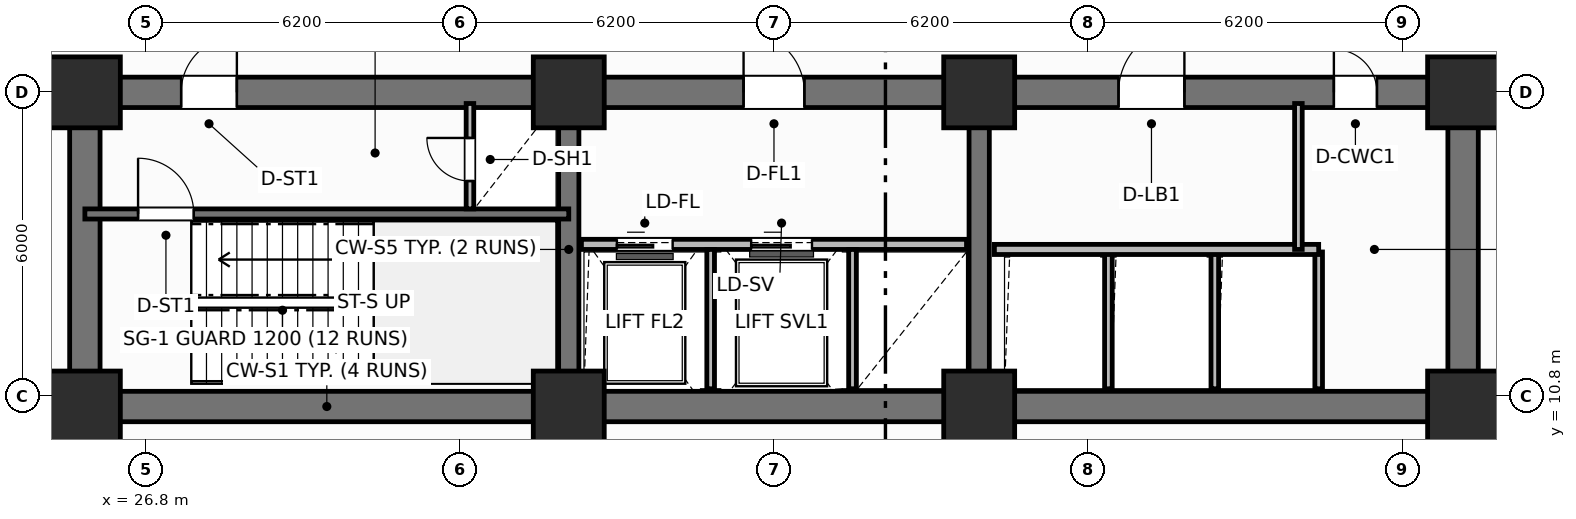
"""IFC4 building model, lengths in metres.
Left out: names, types, materials, properties, quantities, classifications, styles, units other than length and angle.
Written with IfcOpenShell. Run it as: python <this file> out.ifc"""

import sys

from ifc_helpers import new_model, si_unit, direction, frame, frame_2d, origin, origin_2d, place, context, subcontext, project, spatial, rectangle, extrude, element, fill, save


model = new_model("IFC4")
c1 = context("Model", 3, precision=1e-05, world=origin(), true_north=direction((0.0, 1.0)))
c2 = subcontext(c1, "Body", "Model", "MODEL_VIEW")
j1 = project(units=[si_unit("LENGTHUNIT", "METRE"), si_unit("PLANEANGLEUNIT", "RADIAN")], contexts=[c1])
p1 = place(None, origin())
s1 = spatial("IfcSite", under=j1, at=p1, CompositionType="ELEMENT")
p2 = place(p1, origin())
s2 = spatial("IfcBuilding", under=s1, at=p2, CompositionType="ELEMENT")
p3 = place(p2, frame((0.0, 0.0, 11.1)))
s3 = spatial("IfcBuildingStorey", under=s2, at=p3, CompositionType="ELEMENT", Elevation=11.1)
p4 = place(p3, frame((52.8, 10.6, 0.0), z_axis=(0.0, 0.0, 1.0), x_axis=(-1.0, 0.0, 0.0)))
e1 = element("IfcWall", 1, at=p4, inside=s3, PredefinedType="SHEAR", context=c2, shape_type="SweptSolid", body=[
    extrude(rectangle(XDim=27.2, YDim=0.6, at=frame_2d((13.6, 0.0))), origin(), (0.0, 0.0, 1.0), 4.5),
])
for number, where, z_axis, x_axis in (
    (2, (25.6, 10.9, 0.0), (0.0, 0.0, 1.0), (0.0, 1.0, 0.0)),
    (3, (52.8, 10.9, 0.0), (0.0, 0.0, 1.0), (0.0, 1.0, 0.0)),
):
    element("IfcWall", number, at=place(p3, frame(where, z_axis=z_axis, x_axis=x_axis)), inside=s3, PredefinedType="SHEAR", context=c2, shape_type="SweptSolid", body=[
        extrude(rectangle(XDim=5.6, YDim=0.6, at=frame_2d((2.8, 0.0))), origin(), (0.0, 0.0, 1.0), 4.5),
    ])
p5 = place(p3, frame((25.6, 16.8, 0.0), z_axis=(0.0, 0.0, 1.0), x_axis=(1.0, 0.0, 0.0)))
e4 = element("IfcWall", 4, at=p5, inside=s3, PredefinedType="SHEAR", context=c2, shape_type="SweptSolid", body=[
    extrude(rectangle(XDim=27.2, YDim=0.6, at=frame_2d((13.6, 0.0))), origin(), (0.0, 0.0, 1.0), 4.5),
])
p6 = place(p5, frame((1.9, 0.0, 0.0)))
e5 = element("IfcOpeningElement", 5, at=p6, cuts=e4, PredefinedType="OPENING", context=c2, shape_type="SweptSolid", body=[
    extrude(rectangle(XDim=1.1, YDim=2.15, at=frame_2d((0.55, 1.075))), frame((0.0, 0.31, 0.0), z_axis=(0.0, -1.0, 0.0), x_axis=(1.0, 0.0, 0.0)), (0.0, 0.0, 1.0), 0.62),
])
p7 = place(p5, frame((13.0, 0.0, 0.0)))
e6 = element("IfcOpeningElement", 6, at=p7, cuts=e4, PredefinedType="OPENING", context=c2, shape_type="SweptSolid", body=[
    extrude(rectangle(XDim=1.2, YDim=2.15, at=frame_2d((0.6, 1.075))), frame((0.0, 0.31, 0.0), z_axis=(0.0, -1.0, 0.0), x_axis=(1.0, 0.0, 0.0)), (0.0, 0.0, 1.0), 0.62),
])
p8 = place(p5, frame((20.4, 0.0, 0.0)))
e7 = element("IfcOpeningElement", 7, at=p8, cuts=e4, PredefinedType="OPENING", context=c2, shape_type="SweptSolid", body=[
    extrude(rectangle(XDim=1.3, YDim=2.2, at=frame_2d((0.65, 1.1))), frame((0.0, 0.31, 0.0), z_axis=(0.0, -1.0, 0.0), x_axis=(1.0, 0.0, 0.0)), (0.0, 0.0, 1.0), 0.62),
])
p9 = place(p5, frame((24.65, 0.0, 0.0)))
e8 = element("IfcOpeningElement", 8, at=p9, cuts=e4, PredefinedType="OPENING", context=c2, shape_type="SweptSolid", body=[
    extrude(rectangle(XDim=0.85, YDim=2.1, at=frame_2d((0.425, 1.05))), frame((0.0, 0.31, 0.0), z_axis=(0.0, -1.0, 0.0), x_axis=(1.0, 0.0, 0.0)), (0.0, 0.0, 1.0), 0.62),
])
for number, where, z_axis, x_axis in (
    (9, (35.15, 10.9, 0.0), (0.0, 0.0, 1.0), (0.0, 1.0, 0.0)),
    (10, (43.25, 10.9, 0.0), (0.0, 0.0, 1.0), (0.0, 1.0, 0.0)),
):
    element("IfcWall", number, at=place(p3, frame(where, z_axis=z_axis, x_axis=x_axis)), inside=s3, PredefinedType="SHEAR", context=c2, shape_type="SweptSolid", body=[
        extrude(rectangle(XDim=5.6, YDim=0.4, at=frame_2d((2.8, 0.0))), origin(), (0.0, 0.0, 1.0), 4.5),
    ])
for number, where, z_axis, x_axis in (
    (11, (25.6, 10.6, 0.0), (0.0, 0.0, 1.0), (1.0, 0.0, 0.0)),
    (12, (25.6, 16.8, 0.0), (0.0, 0.0, 1.0), (1.0, 0.0, 0.0)),
    (13, (35.15, 10.6, 0.0), (0.0, 0.0, 1.0), (1.0, 0.0, 0.0)),
    (14, (35.15, 16.8, 0.0), (0.0, 0.0, 1.0), (1.0, 0.0, 0.0)),
    (15, (43.25, 10.6, 0.0), (0.0, 0.0, 1.0), (1.0, 0.0, 0.0)),
    (16, (43.25, 16.8, 0.0), (0.0, 0.0, 1.0), (1.0, 0.0, 0.0)),
    (17, (52.8, 10.6, 0.0), (0.0, 0.0, 1.0), (1.0, 0.0, 0.0)),
    (18, (52.8, 16.8, 0.0), (0.0, 0.0, 1.0), (1.0, 0.0, 0.0)),
):
    element("IfcColumn", number, at=place(p3, frame(where, z_axis=z_axis, x_axis=x_axis)), inside=s3, PredefinedType="COLUMN", context=c2, shape_type="SweptSolid", body=[
        extrude(rectangle(XDim=1.4, YDim=1.4, at=origin_2d()), origin(), (0.0, 0.0, 1.0), 4.5),
    ])
p10 = place(p3, frame((25.6, 14.4, 0.0), z_axis=(0.0, 0.0, 1.0), x_axis=(1.0, 0.0, 0.0)))
e19 = element("IfcWall", 19, at=p10, inside=s3, PredefinedType="SHEAR", context=c2, shape_type="SweptSolid", body=[
    extrude(rectangle(XDim=9.55, YDim=0.2, at=frame_2d((4.775, 0.0))), origin(), (0.0, 0.0, 1.0), 4.5),
])
p11 = place(p10, frame((1.05, 0.0, 0.0)))
e20 = element("IfcOpeningElement", 20, at=p11, cuts=e19, PredefinedType="OPENING", context=c2, shape_type="SweptSolid", body=[
    extrude(rectangle(XDim=1.1, YDim=2.15, at=frame_2d((0.55, 1.075))), frame((0.0, 0.11, 0.0), z_axis=(0.0, -1.0, 0.0), x_axis=(1.0, 0.0, 0.0)), (0.0, 0.0, 1.0), 0.22),
])
p12 = place(p3, frame((33.2, 14.5, 0.0), z_axis=(0.0, 0.0, 1.0), x_axis=(0.0, 1.0, 0.0)))
e21 = element("IfcWall", 21, at=p12, inside=s3, PredefinedType="PARTITIONING", context=c2, shape_type="SweptSolid", body=[
    extrude(rectangle(XDim=2.08, YDim=0.15, at=frame_2d((1.04, 0.0))), origin(), (0.0, 0.0, 1.0), 3.42),
])
p13 = place(p12, frame((0.55, 0.0, 0.0)))
e22 = element("IfcOpeningElement", 22, at=p13, cuts=e21, PredefinedType="OPENING", context=c2, shape_type="SweptSolid", body=[
    extrude(rectangle(XDim=0.85, YDim=2.05, at=frame_2d((0.425, 1.025))), frame((0.0, 0.085, 0.0), z_axis=(0.0, -1.0, 0.0), x_axis=(1.0, 0.0, 0.0)), (0.0, 0.0, 1.0), 0.17),
])
p14 = place(p3, frame((35.4, 13.8, 0.0), z_axis=(0.0, 0.0, 1.0), x_axis=(1.0, 0.0, 0.0)))
e23 = element("IfcWall", 23, at=p14, inside=s3, PredefinedType="PARTITIONING", context=c2, shape_type="SweptSolid", body=[
    extrude(rectangle(XDim=7.6, YDim=0.2, at=frame_2d((3.8, 0.0))), origin(), (0.0, 0.0, 1.0), 3.08),
])
p15 = place(p14, frame((0.7, 0.0, 0.0)))
e24 = element("IfcOpeningElement", 24, at=p15, cuts=e23, PredefinedType="OPENING", context=c2, shape_type="SweptSolid", body=[
    extrude(rectangle(XDim=1.1, YDim=2.15, at=frame_2d((0.55, 1.075))), frame((0.0, 0.11, 0.0), z_axis=(0.0, -1.0, 0.0), x_axis=(1.0, 0.0, 0.0)), (0.0, 0.0, 1.0), 0.22),
])
p16 = place(p14, frame((3.35, 0.0, 0.0)))
e25 = element("IfcOpeningElement", 25, at=p16, cuts=e23, PredefinedType="OPENING", context=c2, shape_type="SweptSolid", body=[
    extrude(rectangle(XDim=1.2, YDim=2.15, at=frame_2d((0.6, 1.075))), frame((0.0, 0.11, 0.0), z_axis=(0.0, -1.0, 0.0), x_axis=(1.0, 0.0, 0.0)), (0.0, 0.0, 1.0), 0.22),
])
for number, where, z_axis, x_axis in (
    (26, (37.95, 10.95, 0.0), (0.0, 0.0, 1.0), (0.0, 1.0, 0.0)),
    (27, (40.75, 10.95, 0.0), (0.0, 0.0, 1.0), (0.0, 1.0, 0.0)),
):
    element("IfcWall", number, at=place(p3, frame(where, z_axis=z_axis, x_axis=x_axis)), inside=s3, PredefinedType="PARTITIONING", context=c2, shape_type="SweptSolid", body=[
        extrude(rectangle(XDim=2.75, YDim=0.15, at=frame_2d((1.375, 0.0))), origin(), (0.0, 0.0, 1.0), 3.42),
    ])
for number, where, z_axis, x_axis in (
    (28, (45.8, 10.95, 0.0), (0.0, 0.0, 1.0), (0.0, 1.0, 0.0)),
    (29, (47.9, 10.95, 0.0), (0.0, 0.0, 1.0), (0.0, 1.0, 0.0)),
    (30, (49.95, 10.95, 0.0), (0.0, 0.0, 1.0), (0.0, 1.0, 0.0)),
):
    element("IfcWall", number, at=place(p3, frame(where, z_axis=z_axis, x_axis=x_axis)), inside=s3, PredefinedType="PARTITIONING", context=c2, shape_type="SweptSolid", body=[
        extrude(rectangle(XDim=2.7, YDim=0.15, at=frame_2d((1.35, 0.0))), origin(), (0.0, 0.0, 1.0), 3.42),
    ])
p17 = place(p3, frame((43.55, 13.7, 0.0), z_axis=(0.0, 0.0, 1.0), x_axis=(1.0, 0.0, 0.0)))
e31 = element("IfcWall", 31, at=p17, inside=s3, PredefinedType="PARTITIONING", context=c2, shape_type="SweptSolid", body=[
    extrude(rectangle(XDim=6.4, YDim=0.2, at=frame_2d((3.2, 0.0))), origin(), (0.0, 0.0, 1.0), 3.42),
])
p18 = place(p3, frame((49.55, 13.7, 0.0), z_axis=(0.0, 0.0, 1.0), x_axis=(0.0, 1.0, 0.0)))
e32 = element("IfcWall", 32, at=p18, inside=s3, PredefinedType="PARTITIONING", context=c2, shape_type="SweptSolid", body=[
    extrude(rectangle(XDim=2.88, YDim=0.15, at=frame_2d((1.44, 0.0))), origin(), (0.0, 0.0, 1.0), 3.42),
])
p19 = place(p3, frame((12.0, 16.85, 0.0), z_axis=(0.0, 0.0, 1.0), x_axis=(1.0, 0.0, 0.0)))
e33 = element("IfcWall", 33, at=p19, inside=s3, PredefinedType="PARTITIONING", context=c2, shape_type="SweptSolid", body=[
    extrude(rectangle(XDim=13.25, YDim=0.15, at=frame_2d((6.625, 0.0))), origin(), (0.0, 0.0, 1.0), 3.42),
])
p20 = place(p19, frame((7.5, 0.0, 0.0)))
e34 = element("IfcOpeningElement", 34, at=p20, cuts=e33, PredefinedType="OPENING", context=c2, shape_type="SweptSolid", body=[
    extrude(rectangle(XDim=1.0, YDim=2.15, at=frame_2d((0.5, 1.075))), frame((0.0, 0.085, 0.0), z_axis=(0.0, -1.0, 0.0), x_axis=(1.0, 0.0, 0.0)), (0.0, 0.0, 1.0), 0.17),
])
p21 = place(p3, frame((53.15, 16.85, 0.0), z_axis=(0.0, 0.0, 1.0), x_axis=(1.0, 0.0, 0.0)))
e35 = element("IfcWall", 35, at=p21, inside=s3, PredefinedType="PARTITIONING", context=c2, shape_type="SweptSolid", body=[
    extrude(rectangle(XDim=13.25, YDim=0.15, at=frame_2d((6.625, 0.0))), origin(), (0.0, 0.0, 1.0), 3.42),
])
p22 = place(p21, frame((4.2, 0.0, 0.0)))
e36 = element("IfcOpeningElement", 36, at=p22, cuts=e35, PredefinedType="OPENING", context=c2, shape_type="SweptSolid", body=[
    extrude(rectangle(XDim=1.0, YDim=2.15, at=frame_2d((0.5, 1.075))), frame((0.0, 0.085, 0.0), z_axis=(0.0, -1.0, 0.0), x_axis=(1.0, 0.0, 0.0)), (0.0, 0.0, 1.0), 0.17),
])
p23 = place(p11, origin())
e37 = element("IfcDoor", 37, at=p23, inside=s3, OperationType="SINGLE_SWING_LEFT", PredefinedType="DOOR", context=c2, shape_type="SweptSolid", body=[
    extrude(rectangle(XDim=1.1, YDim=2.15, at=frame_2d((0.55, 1.075))), frame((0.0, 0.025, 0.0), z_axis=(0.0, -1.0, 0.0), x_axis=(1.0, 0.0, 0.0)), (0.0, 0.0, 1.0), 0.05),
])
fill(e20, e37)
p24 = place(p13, origin())
e38 = element("IfcDoor", 38, at=p24, inside=s3, OperationType="SINGLE_SWING_RIGHT", PredefinedType="TRAPDOOR", context=c2, shape_type="SweptSolid", body=[
    extrude(rectangle(XDim=0.85, YDim=2.05, at=frame_2d((0.425, 1.025))), frame((0.0, 0.025, 0.0), z_axis=(0.0, -1.0, 0.0), x_axis=(1.0, 0.0, 0.0)), (0.0, 0.0, 1.0), 0.05),
])
fill(e22, e38)
p25 = place(p15, origin())
e39 = element("IfcDoor", 39, at=p25, inside=s3, OperationType="SLIDING_TO_LEFT", PredefinedType="DOOR", context=c2, shape_type="SweptSolid", body=[
    extrude(rectangle(XDim=1.1, YDim=2.15, at=frame_2d((0.55, 1.075))), frame((0.0, 0.025, 0.0), z_axis=(0.0, -1.0, 0.0), x_axis=(1.0, 0.0, 0.0)), (0.0, 0.0, 1.0), 0.05),
])
fill(e24, e39)
p26 = place(p16, origin())
e40 = element("IfcDoor", 40, at=p26, inside=s3, OperationType="SLIDING_TO_LEFT", PredefinedType="DOOR", context=c2, shape_type="SweptSolid", body=[
    extrude(rectangle(XDim=1.2, YDim=2.15, at=frame_2d((0.6, 1.075))), frame((0.0, 0.025, 0.0), z_axis=(0.0, -1.0, 0.0), x_axis=(1.0, 0.0, 0.0)), (0.0, 0.0, 1.0), 0.05),
])
fill(e25, e40)
p27 = place(p6, origin())
e41 = element("IfcDoor", 41, at=p27, inside=s3, OperationType="SINGLE_SWING_RIGHT", PredefinedType="DOOR", context=c2, shape_type="SweptSolid", body=[
    extrude(rectangle(XDim=1.1, YDim=2.15, at=frame_2d((0.55, 1.075))), frame((0.0, 0.025, 0.0), z_axis=(0.0, -1.0, 0.0), x_axis=(1.0, 0.0, 0.0)), (0.0, 0.0, 1.0), 0.05),
])
fill(e5, e41)
p28 = place(p7, origin())
e42 = element("IfcDoor", 42, at=p28, inside=s3, OperationType="SINGLE_SWING_LEFT", PredefinedType="DOOR", context=c2, shape_type="SweptSolid", body=[
    extrude(rectangle(XDim=1.2, YDim=2.15, at=frame_2d((0.6, 1.075))), frame((0.0, 0.025, 0.0), z_axis=(0.0, -1.0, 0.0), x_axis=(1.0, 0.0, 0.0)), (0.0, 0.0, 1.0), 0.05),
])
fill(e6, e42)
p29 = place(p8, origin())
e43 = element("IfcDoor", 43, at=p29, inside=s3, OperationType="SINGLE_SWING_RIGHT", PredefinedType="DOOR", context=c2, shape_type="SweptSolid", body=[
    extrude(rectangle(XDim=1.3, YDim=2.2, at=frame_2d((0.65, 1.1))), frame((0.0, 0.025, 0.0), z_axis=(0.0, -1.0, 0.0), x_axis=(1.0, 0.0, 0.0)), (0.0, 0.0, 1.0), 0.05),
])
fill(e7, e43)
p30 = place(p9, origin())
e44 = element("IfcDoor", 44, at=p30, inside=s3, OperationType="SINGLE_SWING_LEFT", PredefinedType="DOOR", context=c2, shape_type="SweptSolid", body=[
    extrude(rectangle(XDim=0.85, YDim=2.1, at=frame_2d((0.425, 1.05))), frame((0.0, 0.025, 0.0), z_axis=(0.0, -1.0, 0.0), x_axis=(1.0, 0.0, 0.0)), (0.0, 0.0, 1.0), 0.05),
])
fill(e8, e44)
save(model, sys.argv[1])
